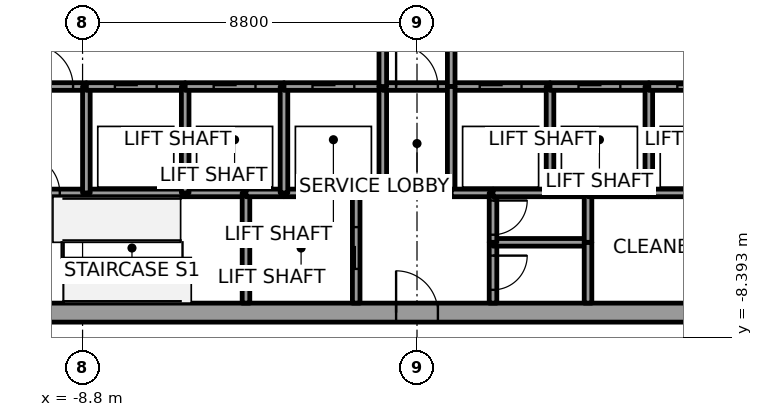
"""IFC4 building model, lengths in metres.
Left out: names, types, materials, properties, quantities, classifications, styles, units other than length and angle.
Written with IfcOpenShell. Run it as: python <this file> out.ifc"""

import sys

from ifc_helpers import new_model, si_unit, direction, frame, frame_2d, origin, place, context, subcontext, project, spatial, rectangle, extrude, element, fill, save


model = new_model("IFC4")
c1 = context("Model", 3, precision=1e-05, world=origin(), true_north=direction((0.0, 1.0)))
c2 = subcontext(c1, "Body", "Model", "MODEL_VIEW")
j1 = project(units=[si_unit("LENGTHUNIT", "METRE"), si_unit("PLANEANGLEUNIT", "RADIAN")], contexts=[c1])
p1 = place(None, origin())
s1 = spatial("IfcSite", under=j1, at=p1, CompositionType="ELEMENT")
p2 = place(p1, origin())
s2 = spatial("IfcBuilding", under=s1, at=p2, CompositionType="ELEMENT")
p3 = place(p2, frame((0.0, 0.0, 201.8)))
s3 = spatial("IfcBuildingStorey", under=s2, at=p3, CompositionType="ELEMENT", Elevation=201.8)
p4 = place(p3, frame((-11.0, -7.75, 0.0), z_axis=(0.0, 0.0, 1.0), x_axis=(1.0, 0.0, 0.0)))
e1 = element("IfcWall", 1, at=p4, inside=s3, PredefinedType="SHEAR", context=c2, shape_type="SweptSolid", body=[
    extrude(rectangle(XDim=22.0, YDim=0.5, at=frame_2d((11.0, 0.0))), origin(), (0.0, 0.0, 1.0), 4.0),
])
p5 = place(p4, frame((10.45, 0.0, 0.0)))
e2 = element("IfcOpeningElement", 2, at=p5, cuts=e1, PredefinedType="OPENING", context=c2, shape_type="SweptSolid", body=[
    extrude(rectangle(XDim=1.1, YDim=2.1, at=frame_2d((0.55, 1.05))), frame((0.0, 0.25, 0.0), z_axis=(0.0, -1.0, 0.0), x_axis=(1.0, 0.0, 0.0)), (0.0, 0.0, 1.0), 0.5),
])
p6 = place(p3, frame((-10.5, -4.6, 0.0), z_axis=(0.0, 0.0, 1.0), x_axis=(1.0, 0.0, 0.0)))
e3 = element("IfcWall", 3, at=p6, inside=s3, PredefinedType="SOLIDWALL", context=c2, shape_type="SweptSolid", body=[
    extrude(rectangle(XDim=1.8, YDim=0.2, at=frame_2d((0.9, 0.0))), origin(), (0.0, 0.0, 1.0), 3.85),
])
p7 = place(p6, frame((0.1, 0.0, 0.0)))
e4 = element("IfcOpeningElement", 4, at=p7, cuts=e3, PredefinedType="OPENING", context=c2, shape_type="SweptSolid", body=[
    extrude(rectangle(XDim=1.0, YDim=2.1, at=frame_2d((0.5, 1.05))), frame((0.0, 0.1, 0.0), z_axis=(0.0, -1.0, 0.0), x_axis=(1.0, 0.0, 0.0)), (0.0, 0.0, 1.0), 0.2),
])
p8 = place(p3, frame((-10.5, -1.8, 0.0), z_axis=(0.0, 0.0, 1.0), x_axis=(1.0, 0.0, 0.0)))
e5 = element("IfcWall", 5, at=p8, inside=s3, PredefinedType="SOLIDWALL", context=c2, shape_type="SweptSolid", body=[
    extrude(rectangle(XDim=1.8, YDim=0.2, at=frame_2d((0.9, 0.0))), origin(), (0.0, 0.0, 1.0), 3.85),
])
p9 = place(p8, frame((0.35, 0.0, 0.0)))
e6 = element("IfcOpeningElement", 6, at=p9, cuts=e5, PredefinedType="OPENING", context=c2, shape_type="SweptSolid", body=[
    extrude(rectangle(XDim=1.1, YDim=2.1, at=frame_2d((0.55, 1.05))), frame((0.0, 0.1, 0.0), z_axis=(0.0, -1.0, 0.0), x_axis=(1.0, 0.0, 0.0)), (0.0, 0.0, 1.0), 0.2),
])
p10 = place(p3, frame((-8.7, -4.6, 0.0), z_axis=(0.0, 0.0, 1.0), x_axis=(1.0, 0.0, 0.0)))
e7 = element("IfcWall", 7, at=p10, inside=s3, PredefinedType="SOLIDWALL", context=c2, shape_type="SweptSolid", body=[
    extrude(rectangle(XDim=2.6, YDim=0.2, at=frame_2d((1.3, 0.0))), origin(), (0.0, 0.0, 1.0), 3.85),
])
p11 = place(p3, frame((-8.7, -4.6, 0.0), z_axis=(0.0, 0.0, 1.0), x_axis=(0.0, 1.0, 0.0)))
e8 = element("IfcWall", 8, at=p11, inside=s3, PredefinedType="SOLIDWALL", context=c2, shape_type="SweptSolid", body=[
    extrude(rectangle(XDim=2.8, YDim=0.2, at=frame_2d((1.4, 0.0))), origin(), (0.0, 0.0, 1.0), 3.85),
])
p12 = place(p3, frame((-8.7, -1.8, 0.0), z_axis=(0.0, 0.0, 1.0), x_axis=(1.0, 0.0, 0.0)))
e9 = element("IfcWall", 9, at=p12, inside=s3, PredefinedType="SOLIDWALL", context=c2, shape_type="SweptSolid", body=[
    extrude(rectangle(XDim=2.6, YDim=0.2, at=frame_2d((1.3, 0.0))), origin(), (0.0, 0.0, 1.0), 3.85),
])
p13 = place(p12, frame((0.75, 0.0, 0.0)))
e10 = element("IfcOpeningElement", 10, at=p13, cuts=e9, PredefinedType="OPENING", context=c2, shape_type="SweptSolid", body=[
    extrude(rectangle(XDim=1.1, YDim=2.1, at=frame_2d((0.55, 1.05))), frame((0.0, 0.1, 0.0), z_axis=(0.0, -1.0, 0.0), x_axis=(1.0, 0.0, 0.0)), (0.0, 0.0, 1.0), 0.2),
])
p14 = place(p3, frame((-6.1, -4.6, 0.0), z_axis=(0.0, 0.0, 1.0), x_axis=(1.0, 0.0, 0.0)))
e11 = element("IfcWall", 11, at=p14, inside=s3, PredefinedType="SOLIDWALL", context=c2, shape_type="SweptSolid", body=[
    extrude(rectangle(XDim=1.6, YDim=0.2, at=frame_2d((0.8, 0.0))), origin(), (0.0, 0.0, 1.0), 3.85),
])
p15 = place(p3, frame((-6.1, -4.6, 0.0), z_axis=(0.0, 0.0, 1.0), x_axis=(0.0, 1.0, 0.0)))
e12 = element("IfcWall", 12, at=p15, inside=s3, PredefinedType="SOLIDWALL", context=c2, shape_type="SweptSolid", body=[
    extrude(rectangle(XDim=2.8, YDim=0.2, at=frame_2d((1.4, 0.0))), origin(), (0.0, 0.0, 1.0), 3.85),
])
p16 = place(p3, frame((-6.1, -1.8, 0.0), z_axis=(0.0, 0.0, 1.0), x_axis=(1.0, 0.0, 0.0)))
e13 = element("IfcWall", 13, at=p16, inside=s3, PredefinedType="SOLIDWALL", context=c2, shape_type="SweptSolid", body=[
    extrude(rectangle(XDim=2.6, YDim=0.2, at=frame_2d((1.3, 0.0))), origin(), (0.0, 0.0, 1.0), 3.85),
])
p17 = place(p16, frame((0.75, 0.0, 0.0)))
e14 = element("IfcOpeningElement", 14, at=p17, cuts=e13, PredefinedType="OPENING", context=c2, shape_type="SweptSolid", body=[
    extrude(rectangle(XDim=1.1, YDim=2.1, at=frame_2d((0.55, 1.05))), frame((0.0, 0.1, 0.0), z_axis=(0.0, -1.0, 0.0), x_axis=(1.0, 0.0, 0.0)), (0.0, 0.0, 1.0), 0.2),
])
p18 = place(p3, frame((-4.5, -4.6, 0.0), z_axis=(0.0, 0.0, 1.0), x_axis=(0.0, -1.0, 0.0)))
e15 = element("IfcWall", 15, at=p18, inside=s3, PredefinedType="SOLIDWALL", context=c2, shape_type="SweptSolid", body=[
    extrude(rectangle(XDim=2.9, YDim=0.2, at=frame_2d((1.45, 0.0))), origin(), (0.0, 0.0, 1.0), 3.85),
])
p19 = place(p3, frame((-4.5, -4.6, 0.0), z_axis=(0.0, 0.0, 1.0), x_axis=(1.0, 0.0, 0.0)))
e16 = element("IfcWall", 16, at=p19, inside=s3, PredefinedType="SOLIDWALL", context=c2, shape_type="SweptSolid", body=[
    extrude(rectangle(XDim=1.0, YDim=0.2, at=frame_2d((0.5, 0.0))), origin(), (0.0, 0.0, 1.0), 3.85),
])
p20 = place(p3, frame((-3.5, -4.6, 0.0), z_axis=(0.0, 0.0, 1.0), x_axis=(1.0, 0.0, 0.0)))
e17 = element("IfcWall", 17, at=p20, inside=s3, PredefinedType="SOLIDWALL", context=c2, shape_type="SweptSolid", body=[
    extrude(rectangle(XDim=1.9, YDim=0.2, at=frame_2d((0.95, 0.0))), origin(), (0.0, 0.0, 1.0), 3.85),
])
p21 = place(p3, frame((-3.5, -4.6, 0.0), z_axis=(0.0, 0.0, 1.0), x_axis=(0.0, 1.0, 0.0)))
e18 = element("IfcWall", 18, at=p21, inside=s3, PredefinedType="SOLIDWALL", context=c2, shape_type="SweptSolid", body=[
    extrude(rectangle(XDim=2.8, YDim=0.2, at=frame_2d((1.4, 0.0))), origin(), (0.0, 0.0, 1.0), 3.85),
])
p22 = place(p3, frame((-3.5, -1.8, 0.0), z_axis=(0.0, 0.0, 1.0), x_axis=(1.0, 0.0, 0.0)))
e19 = element("IfcWall", 19, at=p22, inside=s3, PredefinedType="SOLIDWALL", context=c2, shape_type="SweptSolid", body=[
    extrude(rectangle(XDim=2.6, YDim=0.2, at=frame_2d((1.3, 0.0))), origin(), (0.0, 0.0, 1.0), 3.85),
])
p23 = place(p22, frame((0.75, 0.0, 0.0)))
e20 = element("IfcOpeningElement", 20, at=p23, cuts=e19, PredefinedType="OPENING", context=c2, shape_type="SweptSolid", body=[
    extrude(rectangle(XDim=1.1, YDim=2.1, at=frame_2d((0.55, 1.05))), frame((0.0, 0.1, 0.0), z_axis=(0.0, -1.0, 0.0), x_axis=(1.0, 0.0, 0.0)), (0.0, 0.0, 1.0), 0.2),
])
p24 = place(p3, frame((-1.6, -7.5, 0.0), z_axis=(0.0, 0.0, 1.0), x_axis=(0.0, 1.0, 0.0)))
e21 = element("IfcWall", 21, at=p24, inside=s3, PredefinedType="SOLIDWALL", context=c2, shape_type="SweptSolid", body=[
    extrude(rectangle(XDim=2.9, YDim=0.2, at=frame_2d((1.45, 0.0))), origin(), (0.0, 0.0, 1.0), 3.85),
])
p25 = place(p24, frame((0.9, 0.0, 0.0)))
e22 = element("IfcOpeningElement", 22, at=p25, cuts=e21, PredefinedType="OPENING", context=c2, shape_type="SweptSolid", body=[
    extrude(rectangle(XDim=1.1, YDim=2.1, at=frame_2d((0.55, 1.05))), frame((0.0, 0.1, 0.0), z_axis=(0.0, -1.0, 0.0), x_axis=(1.0, 0.0, 0.0)), (0.0, 0.0, 1.0), 0.2),
])
p26 = place(p3, frame((-1.6, -4.6, 0.0), z_axis=(0.0, 0.0, 1.0), x_axis=(1.0, 0.0, 0.0)))
e23 = element("IfcWall", 23, at=p26, inside=s3, PredefinedType="SOLIDWALL", context=c2, shape_type="SweptSolid", body=[
    extrude(rectangle(XDim=0.7, YDim=0.2, at=frame_2d((0.35, 0.0))), origin(), (0.0, 0.0, 1.0), 3.85),
])
p27 = place(p3, frame((-0.9, -4.6, 0.0), z_axis=(0.0, 0.0, 1.0), x_axis=(0.0, 1.0, 0.0)))
e24 = element("IfcWall", 24, at=p27, inside=s3, PredefinedType="SOLIDWALL", context=c2, shape_type="SweptSolid", body=[
    extrude(rectangle(XDim=2.8, YDim=0.2, at=frame_2d((1.4, 0.0))), origin(), (0.0, 0.0, 1.0), 3.85),
])
p28 = place(p3, frame((-0.9, -1.8, 0.0), z_axis=(0.0, 0.0, 1.0), x_axis=(1.0, 0.0, 0.0)))
e25 = element("IfcWall", 25, at=p28, inside=s3, PredefinedType="SOLIDWALL", context=c2, shape_type="SweptSolid", body=[
    extrude(rectangle(XDim=1.8, YDim=0.2, at=frame_2d((0.9, 0.0))), origin(), (0.0, 0.0, 1.0), 3.85),
])
p29 = place(p28, frame((0.35, 0.0, 0.0)))
e26 = element("IfcOpeningElement", 26, at=p29, cuts=e25, PredefinedType="OPENING", context=c2, shape_type="SweptSolid", body=[
    extrude(rectangle(XDim=1.1, YDim=2.1, at=frame_2d((0.55, 1.05))), frame((0.0, 0.1, 0.0), z_axis=(0.0, -1.0, 0.0), x_axis=(1.0, 0.0, 0.0)), (0.0, 0.0, 1.0), 0.2),
])
p30 = place(p3, frame((-0.9, 1.8, 0.0), z_axis=(0.0, 0.0, 1.0), x_axis=(0.0, -1.0, 0.0)))
e27 = element("IfcWall", 27, at=p30, inside=s3, PredefinedType="SOLIDWALL", context=c2, shape_type="SweptSolid", body=[
    extrude(rectangle(XDim=3.6, YDim=0.2, at=frame_2d((1.8, 0.0))), origin(), (0.0, 0.0, 1.0), 3.85),
])
p31 = place(p30, frame((1.05, 0.0, 0.0)))
e28 = element("IfcOpeningElement", 28, at=p31, cuts=e27, PredefinedType="OPENING", context=c2, shape_type="SweptSolid", body=[
    extrude(rectangle(XDim=1.5, YDim=2.1, at=frame_2d((0.75, 1.05))), frame((0.0, 0.1, 0.0), z_axis=(0.0, -1.0, 0.0), x_axis=(1.0, 0.0, 0.0)), (0.0, 0.0, 1.0), 0.2),
])
p32 = place(p3, frame((0.9, -1.8, 0.0), z_axis=(0.0, 0.0, 1.0), x_axis=(1.0, 0.0, 0.0)))
e29 = element("IfcWall", 29, at=p32, inside=s3, PredefinedType="SOLIDWALL", context=c2, shape_type="SweptSolid", body=[
    extrude(rectangle(XDim=2.6, YDim=0.2, at=frame_2d((1.3, 0.0))), origin(), (0.0, 0.0, 1.0), 3.85),
])
p33 = place(p32, frame((0.75, 0.0, 0.0)))
e30 = element("IfcOpeningElement", 30, at=p33, cuts=e29, PredefinedType="OPENING", context=c2, shape_type="SweptSolid", body=[
    extrude(rectangle(XDim=1.1, YDim=2.1, at=frame_2d((0.55, 1.05))), frame((0.0, 0.1, 0.0), z_axis=(0.0, -1.0, 0.0), x_axis=(1.0, 0.0, 0.0)), (0.0, 0.0, 1.0), 0.2),
])
p34 = place(p3, frame((0.9, -1.8, 0.0), z_axis=(0.0, 0.0, 1.0), x_axis=(0.0, 1.0, 0.0)))
e31 = element("IfcWall", 31, at=p34, inside=s3, PredefinedType="SOLIDWALL", context=c2, shape_type="SweptSolid", body=[
    extrude(rectangle(XDim=3.6, YDim=0.2, at=frame_2d((1.8, 0.0))), origin(), (0.0, 0.0, 1.0), 3.85),
])
p35 = place(p34, frame((1.05, 0.0, 0.0)))
e32 = element("IfcOpeningElement", 32, at=p35, cuts=e31, PredefinedType="OPENING", context=c2, shape_type="SweptSolid", body=[
    extrude(rectangle(XDim=1.5, YDim=2.1, at=frame_2d((0.75, 1.05))), frame((0.0, 0.1, 0.0), z_axis=(0.0, -1.0, 0.0), x_axis=(1.0, 0.0, 0.0)), (0.0, 0.0, 1.0), 0.2),
])
p36 = place(p3, frame((0.9, -1.8, 0.0), z_axis=(0.0, 0.0, 1.0), x_axis=(0.0, -1.0, 0.0)))
e33 = element("IfcWall", 33, at=p36, inside=s3, PredefinedType="SOLIDWALL", context=c2, shape_type="SweptSolid", body=[
    extrude(rectangle(XDim=2.8, YDim=0.2, at=frame_2d((1.4, 0.0))), origin(), (0.0, 0.0, 1.0), 3.85),
])
p37 = place(p3, frame((0.9, -4.6, 0.0), z_axis=(0.0, 0.0, 1.0), x_axis=(1.0, 0.0, 0.0)))
e34 = element("IfcWall", 34, at=p37, inside=s3, PredefinedType="SOLIDWALL", context=c2, shape_type="SweptSolid", body=[
    extrude(rectangle(XDim=1.1, YDim=0.2, at=frame_2d((0.55, 0.0))), origin(), (0.0, 0.0, 1.0), 3.85),
])
p38 = place(p3, frame((2.0, -5.9, 0.0), z_axis=(0.0, 0.0, 1.0), x_axis=(0.0, -1.0, 0.0)))
e35 = element("IfcWall", 35, at=p38, inside=s3, PredefinedType="SOLIDWALL", context=c2, shape_type="SweptSolid", body=[
    extrude(rectangle(XDim=1.6, YDim=0.2, at=frame_2d((0.8, 0.0))), origin(), (0.0, 0.0, 1.0), 3.85),
])
p39 = place(p38, frame((0.35, 0.0, 0.0)))
e36 = element("IfcOpeningElement", 36, at=p39, cuts=e35, PredefinedType="OPENING", context=c2, shape_type="SweptSolid", body=[
    extrude(rectangle(XDim=0.9, YDim=2.1, at=frame_2d((0.45, 1.05))), frame((0.0, 0.1, 0.0), z_axis=(0.0, -1.0, 0.0), x_axis=(1.0, 0.0, 0.0)), (0.0, 0.0, 1.0), 0.2),
])
p40 = place(p3, frame((4.5, -5.9, 0.0), z_axis=(0.0, 0.0, 1.0), x_axis=(-1.0, 0.0, 0.0)))
e37 = element("IfcWall", 37, at=p40, inside=s3, PredefinedType="SOLIDWALL", context=c2, shape_type="SweptSolid", body=[
    extrude(rectangle(XDim=2.5, YDim=0.2, at=frame_2d((1.25, 0.0))), origin(), (0.0, 0.0, 1.0), 3.85),
])
p41 = place(p3, frame((2.0, -4.6, 0.0), z_axis=(0.0, 0.0, 1.0), x_axis=(0.0, -1.0, 0.0)))
e38 = element("IfcWall", 38, at=p41, inside=s3, PredefinedType="SOLIDWALL", context=c2, shape_type="SweptSolid", body=[
    extrude(rectangle(XDim=1.3, YDim=0.2, at=frame_2d((0.65, 0.0))), origin(), (0.0, 0.0, 1.0), 3.85),
])
p42 = place(p41, frame((0.2, 0.0, 0.0)))
e39 = element("IfcOpeningElement", 39, at=p42, cuts=e38, PredefinedType="OPENING", context=c2, shape_type="SweptSolid", body=[
    extrude(rectangle(XDim=0.9, YDim=2.1, at=frame_2d((0.45, 1.05))), frame((0.0, 0.1, 0.0), z_axis=(0.0, -1.0, 0.0), x_axis=(1.0, 0.0, 0.0)), (0.0, 0.0, 1.0), 0.2),
])
p43 = place(p3, frame((3.5, -4.6, 0.0), z_axis=(0.0, 0.0, 1.0), x_axis=(-1.0, 0.0, 0.0)))
e40 = element("IfcWall", 40, at=p43, inside=s3, PredefinedType="SOLIDWALL", context=c2, shape_type="SweptSolid", body=[
    extrude(rectangle(XDim=1.5, YDim=0.2, at=frame_2d((0.75, 0.0))), origin(), (0.0, 0.0, 1.0), 3.85),
])
p44 = place(p3, frame((4.5, -4.6, 0.0), z_axis=(0.0, 0.0, 1.0), x_axis=(-1.0, 0.0, 0.0)))
e41 = element("IfcWall", 41, at=p44, inside=s3, PredefinedType="SOLIDWALL", context=c2, shape_type="SweptSolid", body=[
    extrude(rectangle(XDim=1.0, YDim=0.2, at=frame_2d((0.5, 0.0))), origin(), (0.0, 0.0, 1.0), 3.85),
])
p45 = place(p3, frame((3.5, -4.6, 0.0), z_axis=(0.0, 0.0, 1.0), x_axis=(0.0, 1.0, 0.0)))
e42 = element("IfcWall", 42, at=p45, inside=s3, PredefinedType="SOLIDWALL", context=c2, shape_type="SweptSolid", body=[
    extrude(rectangle(XDim=2.8, YDim=0.2, at=frame_2d((1.4, 0.0))), origin(), (0.0, 0.0, 1.0), 3.85),
])
p46 = place(p3, frame((3.5, -1.8, 0.0), z_axis=(0.0, 0.0, 1.0), x_axis=(1.0, 0.0, 0.0)))
e43 = element("IfcWall", 43, at=p46, inside=s3, PredefinedType="SOLIDWALL", context=c2, shape_type="SweptSolid", body=[
    extrude(rectangle(XDim=2.6, YDim=0.2, at=frame_2d((1.3, 0.0))), origin(), (0.0, 0.0, 1.0), 3.85),
])
p47 = place(p46, frame((0.75, 0.0, 0.0)))
e44 = element("IfcOpeningElement", 44, at=p47, cuts=e43, PredefinedType="OPENING", context=c2, shape_type="SweptSolid", body=[
    extrude(rectangle(XDim=1.1, YDim=2.1, at=frame_2d((0.55, 1.05))), frame((0.0, 0.1, 0.0), z_axis=(0.0, -1.0, 0.0), x_axis=(1.0, 0.0, 0.0)), (0.0, 0.0, 1.0), 0.2),
])
p48 = place(p3, frame((4.5, -5.9, 0.0), z_axis=(0.0, 0.0, 1.0), x_axis=(0.0, -1.0, 0.0)))
e45 = element("IfcWall", 45, at=p48, inside=s3, PredefinedType="SOLIDWALL", context=c2, shape_type="SweptSolid", body=[
    extrude(rectangle(XDim=1.6, YDim=0.2, at=frame_2d((0.8, 0.0))), origin(), (0.0, 0.0, 1.0), 3.85),
])
p49 = place(p3, frame((4.5, -4.6, 0.0), z_axis=(0.0, 0.0, 1.0), x_axis=(0.0, -1.0, 0.0)))
e46 = element("IfcWall", 46, at=p49, inside=s3, PredefinedType="SOLIDWALL", context=c2, shape_type="SweptSolid", body=[
    extrude(rectangle(XDim=1.3, YDim=0.2, at=frame_2d((0.65, 0.0))), origin(), (0.0, 0.0, 1.0), 3.85),
])
p50 = place(p3, frame((6.1, -4.6, 0.0), z_axis=(0.0, 0.0, 1.0), x_axis=(-1.0, 0.0, 0.0)))
e47 = element("IfcWall", 47, at=p50, inside=s3, PredefinedType="SOLIDWALL", context=c2, shape_type="SweptSolid", body=[
    extrude(rectangle(XDim=1.6, YDim=0.2, at=frame_2d((0.8, 0.0))), origin(), (0.0, 0.0, 1.0), 3.85),
])
p51 = place(p3, frame((8.7, -4.6, 0.0), z_axis=(0.0, 0.0, 1.0), x_axis=(-1.0, 0.0, 0.0)))
e48 = element("IfcWall", 48, at=p51, inside=s3, PredefinedType="SOLIDWALL", context=c2, shape_type="SweptSolid", body=[
    extrude(rectangle(XDim=2.6, YDim=0.2, at=frame_2d((1.3, 0.0))), origin(), (0.0, 0.0, 1.0), 3.85),
])
p52 = place(p3, frame((6.1, -4.6, 0.0), z_axis=(0.0, 0.0, 1.0), x_axis=(0.0, 1.0, 0.0)))
e49 = element("IfcWall", 49, at=p52, inside=s3, PredefinedType="SOLIDWALL", context=c2, shape_type="SweptSolid", body=[
    extrude(rectangle(XDim=2.8, YDim=0.2, at=frame_2d((1.4, 0.0))), origin(), (0.0, 0.0, 1.0), 3.85),
])
p53 = place(p3, frame((6.1, -1.8, 0.0), z_axis=(0.0, 0.0, 1.0), x_axis=(1.0, 0.0, 0.0)))
e50 = element("IfcWall", 50, at=p53, inside=s3, PredefinedType="SOLIDWALL", context=c2, shape_type="SweptSolid", body=[
    extrude(rectangle(XDim=2.6, YDim=0.2, at=frame_2d((1.3, 0.0))), origin(), (0.0, 0.0, 1.0), 3.85),
])
p54 = place(p53, frame((0.75, 0.0, 0.0)))
e51 = element("IfcOpeningElement", 51, at=p54, cuts=e50, PredefinedType="OPENING", context=c2, shape_type="SweptSolid", body=[
    extrude(rectangle(XDim=1.1, YDim=2.1, at=frame_2d((0.55, 1.05))), frame((0.0, 0.1, 0.0), z_axis=(0.0, -1.0, 0.0), x_axis=(1.0, 0.0, 0.0)), (0.0, 0.0, 1.0), 0.2),
])
p55 = place(p13, origin())
e52 = element("IfcDoor", 52, at=p55, inside=s3, OperationType="SLIDING_TO_LEFT", PredefinedType="DOOR", context=c2, shape_type="SweptSolid", body=[
    extrude(rectangle(XDim=1.1, YDim=2.1, at=frame_2d((0.55, 1.05))), frame((0.0, 0.025, 0.0), z_axis=(0.0, -1.0, 0.0), x_axis=(1.0, 0.0, 0.0)), (0.0, 0.0, 1.0), 0.05),
])
fill(e10, e52)
p56 = place(p17, origin())
e53 = element("IfcDoor", 53, at=p56, inside=s3, OperationType="SLIDING_TO_LEFT", PredefinedType="DOOR", context=c2, shape_type="SweptSolid", body=[
    extrude(rectangle(XDim=1.1, YDim=2.1, at=frame_2d((0.55, 1.05))), frame((0.0, 0.025, 0.0), z_axis=(0.0, -1.0, 0.0), x_axis=(1.0, 0.0, 0.0)), (0.0, 0.0, 1.0), 0.05),
])
fill(e14, e53)
p57 = place(p23, origin())
e54 = element("IfcDoor", 54, at=p57, inside=s3, OperationType="SLIDING_TO_LEFT", PredefinedType="DOOR", context=c2, shape_type="SweptSolid", body=[
    extrude(rectangle(XDim=1.1, YDim=2.1, at=frame_2d((0.55, 1.05))), frame((0.0, 0.025, 0.0), z_axis=(0.0, -1.0, 0.0), x_axis=(1.0, 0.0, 0.0)), (0.0, 0.0, 1.0), 0.05),
])
fill(e20, e54)
p58 = place(p33, origin())
e55 = element("IfcDoor", 55, at=p58, inside=s3, OperationType="SLIDING_TO_RIGHT", PredefinedType="DOOR", context=c2, shape_type="SweptSolid", body=[
    extrude(rectangle(XDim=1.1, YDim=2.1, at=frame_2d((0.55, 1.05))), frame((0.0, 0.025, 0.0), z_axis=(0.0, -1.0, 0.0), x_axis=(1.0, 0.0, 0.0)), (0.0, 0.0, 1.0), 0.05),
])
fill(e30, e55)
p59 = place(p47, origin())
e56 = element("IfcDoor", 56, at=p59, inside=s3, OperationType="SLIDING_TO_LEFT", PredefinedType="DOOR", context=c2, shape_type="SweptSolid", body=[
    extrude(rectangle(XDim=1.1, YDim=2.1, at=frame_2d((0.55, 1.05))), frame((0.0, 0.025, 0.0), z_axis=(0.0, -1.0, 0.0), x_axis=(1.0, 0.0, 0.0)), (0.0, 0.0, 1.0), 0.05),
])
fill(e44, e56)
p60 = place(p54, origin())
e57 = element("IfcDoor", 57, at=p60, inside=s3, OperationType="SLIDING_TO_RIGHT", PredefinedType="DOOR", context=c2, shape_type="SweptSolid", body=[
    extrude(rectangle(XDim=1.1, YDim=2.1, at=frame_2d((0.55, 1.05))), frame((0.0, 0.025, 0.0), z_axis=(0.0, -1.0, 0.0), x_axis=(1.0, 0.0, 0.0)), (0.0, 0.0, 1.0), 0.05),
])
fill(e51, e57)
p61 = place(p25, origin())
e58 = element("IfcDoor", 58, at=p61, inside=s3, OperationType="SLIDING_TO_RIGHT", PredefinedType="DOOR", context=c2, shape_type="SweptSolid", body=[
    extrude(rectangle(XDim=1.1, YDim=2.1, at=frame_2d((0.55, 1.05))), frame((0.0, 0.025, 0.0), z_axis=(0.0, -1.0, 0.0), x_axis=(1.0, 0.0, 0.0)), (0.0, 0.0, 1.0), 0.05),
])
fill(e22, e58)
p62 = place(p9, origin())
e59 = element("IfcDoor", 59, at=p62, inside=s3, OperationType="SINGLE_SWING_LEFT", PredefinedType="DOOR", context=c2, shape_type="SweptSolid", body=[
    extrude(rectangle(XDim=1.1, YDim=2.1, at=frame_2d((0.55, 1.05))), frame((0.0, 0.025, 0.0), z_axis=(0.0, -1.0, 0.0), x_axis=(1.0, 0.0, 0.0)), (0.0, 0.0, 1.0), 0.05),
])
fill(e6, e59)
p63 = place(p29, origin())
e60 = element("IfcDoor", 60, at=p63, inside=s3, OperationType="SINGLE_SWING_LEFT", PredefinedType="DOOR", context=c2, shape_type="SweptSolid", body=[
    extrude(rectangle(XDim=1.1, YDim=2.1, at=frame_2d((0.55, 1.05))), frame((0.0, 0.025, 0.0), z_axis=(0.0, -1.0, 0.0), x_axis=(1.0, 0.0, 0.0)), (0.0, 0.0, 1.0), 0.05),
])
fill(e26, e60)
p64 = place(p7, origin())
e61 = element("IfcDoor", 61, at=p64, inside=s3, OperationType="SINGLE_SWING_LEFT", PredefinedType="DOOR", context=c2, shape_type="SweptSolid", body=[
    extrude(rectangle(XDim=1.0, YDim=2.1, at=frame_2d((0.5, 1.05))), frame((0.0, 0.025, 0.0), z_axis=(0.0, -1.0, 0.0), x_axis=(1.0, 0.0, 0.0)), (0.0, 0.0, 1.0), 0.05),
])
fill(e4, e61)
p65 = place(p39, origin())
e62 = element("IfcDoor", 62, at=p65, inside=s3, OperationType="SINGLE_SWING_LEFT", PredefinedType="DOOR", context=c2, shape_type="SweptSolid", body=[
    extrude(rectangle(XDim=0.9, YDim=2.1, at=frame_2d((0.45, 1.05))), frame((0.0, 0.025, 0.0), z_axis=(0.0, -1.0, 0.0), x_axis=(1.0, 0.0, 0.0)), (0.0, 0.0, 1.0), 0.05),
])
fill(e36, e62)
p66 = place(p42, origin())
e63 = element("IfcDoor", 63, at=p66, inside=s3, OperationType="SINGLE_SWING_RIGHT", PredefinedType="DOOR", context=c2, shape_type="SweptSolid", body=[
    extrude(rectangle(XDim=0.9, YDim=2.1, at=frame_2d((0.45, 1.05))), frame((0.0, 0.025, 0.0), z_axis=(0.0, -1.0, 0.0), x_axis=(1.0, 0.0, 0.0)), (0.0, 0.0, 1.0), 0.05),
])
fill(e39, e63)
p67 = place(p5, origin())
e64 = element("IfcDoor", 64, at=p67, inside=s3, OperationType="SINGLE_SWING_LEFT", PredefinedType="DOOR", context=c2, shape_type="SweptSolid", body=[
    extrude(rectangle(XDim=1.1, YDim=2.1, at=frame_2d((0.55, 1.05))), frame((0.0, 0.025, 0.0), z_axis=(0.0, -1.0, 0.0), x_axis=(1.0, 0.0, 0.0)), (0.0, 0.0, 1.0), 0.05),
])
fill(e2, e64)
save(model, sys.argv[1])
